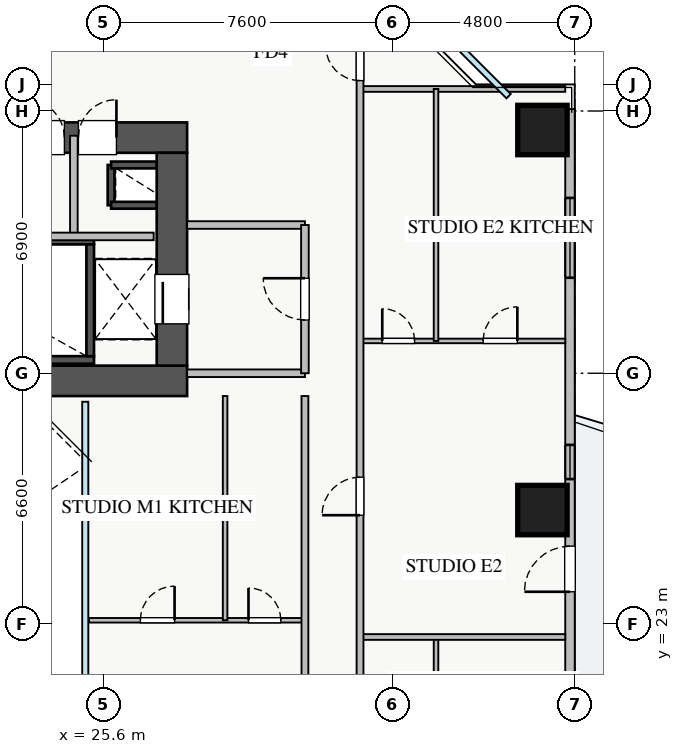
"""IFC4 building model, lengths in metres.
Left out: names, types, materials, properties, quantities, classifications, styles, units other than length and angle.
Written with IfcOpenShell. Run it as: python <this file> out.ifc"""

import sys

from ifc_helpers import new_model, si_unit, direction, frame, frame_2d, origin, origin_2d, place, context, subcontext, project, spatial, rectangle, extrude, source, transform, mapped, element, fill, save


model = new_model("IFC4")
c1 = context("Model", 3, precision=1e-05, world=origin(), true_north=direction((0.0, 1.0)))
c2 = subcontext(c1, "Body", "Model", "MODEL_VIEW")
j1 = project(units=[si_unit("LENGTHUNIT", "METRE"), si_unit("PLANEANGLEUNIT", "RADIAN")], contexts=[c1])
p1 = place(None, origin())
s1 = spatial("IfcSite", under=j1, at=p1, CompositionType="ELEMENT")
p2 = place(p1, origin())
s2 = spatial("IfcBuilding", under=s1, at=p2, CompositionType="ELEMENT")
p3 = place(p2, frame((0.0, 0.0, 89.25)))
s3 = spatial("IfcBuildingStorey", under=s2, at=p3, CompositionType="ELEMENT", Elevation=89.25)
p4 = place(p3, frame((25.8, 34.02, 0.0), z_axis=(0.0, 0.0, 1.0), x_axis=(0.0, 1.0, 0.0)))
e1 = element("IfcWall", 1, at=p4, inside=s3, PredefinedType="SHEAR", context=c2, shape_type="SweptSolid", body=[
    extrude(rectangle(XDim=1.06, YDim=0.18, at=frame_2d((0.53, 0.0))), origin(), (0.0, 0.0, 1.0), 3.03),
])
for number, where, z_axis, x_axis in (
    (2, (25.8, 35.08, 0.0), (0.0, 0.0, 1.0), (1.0, 0.0, 0.0)),
    (3, (25.8, 34.02, 0.0), (0.0, 0.0, 1.0), (1.0, 0.0, 0.0)),
):
    element("IfcWall", number, at=place(p3, frame(where, z_axis=z_axis, x_axis=x_axis)), inside=s3, PredefinedType="SHEAR", context=c2, shape_type="SweptSolid", body=[
        extrude(rectangle(XDim=1.2, YDim=0.18, at=frame_2d((0.6, 0.0))), origin(), (0.0, 0.0, 1.0), 3.03),
    ])
p5 = place(p3, frame((18.2, 29.95, 0.0), z_axis=(0.0, 0.0, 1.0), x_axis=(1.0, 0.0, 0.0)))
e4 = element("IfcWall", 4, at=p5, inside=s3, PredefinedType="SHEAR", context=c2, shape_type="SweptSolid", body=[
    extrude(rectangle(XDim=7.15, YDim=0.2, at=frame_2d((3.575, 0.0))), origin(), (0.0, 0.0, 1.0), 3.25),
])
p6 = place(p3, frame((18.2, 33.09, 0.0), z_axis=(0.0, 0.0, 1.0), x_axis=(1.0, 0.0, 0.0)))
e5 = element("IfcWall", 5, at=p6, inside=s3, PredefinedType="SHEAR", context=c2, shape_type="SweptSolid", body=[
    extrude(rectangle(XDim=7.15, YDim=0.2, at=frame_2d((3.575, 0.0))), origin(), (0.0, 0.0, 1.0), 3.25),
])
p7 = place(p6, frame((0.35, 0.0, 0.0)))
e6 = element("IfcOpeningElement", 6, at=p7, cuts=e5, PredefinedType="OPENING", context=c2, shape_type="SweptSolid", body=[
    extrude(rectangle(XDim=1.1, YDim=2.05, at=frame_2d((0.55, 1.025))), frame((0.0, 0.11, 0.0), z_axis=(0.0, -1.0, 0.0), x_axis=(1.0, 0.0, 0.0)), (0.0, 0.0, 1.0), 0.22),
])
p8 = place(p3, frame((25.25, 30.05, 0.0), z_axis=(0.0, 0.0, 1.0), x_axis=(0.0, 1.0, 0.0)))
e7 = element("IfcWall", 7, at=p8, inside=s3, PredefinedType="SHEAR", context=c2, shape_type="SweptSolid", body=[
    extrude(rectangle(XDim=2.94, YDim=0.2, at=frame_2d((1.47, 0.0))), origin(), (0.0, 0.0, 1.0), 3.25),
])
p9 = place(p3, frame((10.2, 29.4, 0.0), z_axis=(0.0, 0.0, 1.0), x_axis=(1.0, 0.0, 0.0)))
e8 = element("IfcWall", 8, at=p9, inside=s3, PredefinedType="SHEAR", context=c2, shape_type="SweptSolid", body=[
    extrude(rectangle(XDim=17.6, YDim=0.8, at=frame_2d((8.8, 0.0))), origin(), (0.0, 0.0, 1.0), 3.25),
])
p10 = place(p3, frame((10.2, 35.8, 0.0), z_axis=(0.0, 0.0, 1.0), x_axis=(1.0, 0.0, 0.0)))
e9 = element("IfcWall", 9, at=p10, inside=s3, PredefinedType="SHEAR", context=c2, shape_type="SweptSolid", body=[
    extrude(rectangle(XDim=17.6, YDim=0.8, at=frame_2d((8.8, 0.0))), origin(), (0.0, 0.0, 1.0), 3.25),
])
p11 = place(p10, frame((1.15, 0.0, 0.0)))
e10 = element("IfcOpeningElement", 10, at=p11, cuts=e9, PredefinedType="OPENING", context=c2, shape_type="SweptSolid", body=[
    extrude(rectangle(XDim=1.1, YDim=2.05, at=frame_2d((0.55, 1.025))), frame((0.0, 0.41, 0.0), z_axis=(0.0, -1.0, 0.0), x_axis=(1.0, 0.0, 0.0)), (0.0, 0.0, 1.0), 0.82),
])
p12 = place(p10, frame((8.3, 0.0, 0.0)))
e11 = element("IfcOpeningElement", 11, at=p12, cuts=e9, PredefinedType="OPENING", context=c2, shape_type="SweptSolid", body=[
    extrude(rectangle(XDim=1.1, YDim=2.05, at=frame_2d((0.55, 1.025))), frame((0.0, 0.41, 0.0), z_axis=(0.0, -1.0, 0.0), x_axis=(1.0, 0.0, 0.0)), (0.0, 0.0, 1.0), 0.82),
])
p13 = place(p10, frame((10.05, 0.0, 0.0)))
e12 = element("IfcOpeningElement", 12, at=p13, cuts=e9, PredefinedType="OPENING", context=c2, shape_type="SweptSolid", body=[
    extrude(rectangle(XDim=1.1, YDim=2.05, at=frame_2d((0.55, 1.025))), frame((0.0, 0.41, 0.0), z_axis=(0.0, -1.0, 0.0), x_axis=(1.0, 0.0, 0.0)), (0.0, 0.0, 1.0), 0.82),
])
p14 = place(p10, frame((14.74, 0.0, 0.0)))
e13 = element("IfcOpeningElement", 13, at=p14, cuts=e9, PredefinedType="OPENING", context=c2, shape_type="SweptSolid", body=[
    extrude(rectangle(XDim=1.0, YDim=2.05, at=frame_2d((0.5, 1.025))), frame((0.0, 0.41, 0.0), z_axis=(0.0, -1.0, 0.0), x_axis=(1.0, 0.0, 0.0)), (0.0, 0.0, 1.0), 0.82),
])
p15 = place(p10, frame((11.835, 0.0, 0.0)))
e14 = element("IfcOpeningElement", 14, at=p15, cuts=e9, PredefinedType="OPENING", context=c2, shape_type="SweptSolid", body=[
    extrude(rectangle(XDim=1.0, YDim=2.05, at=frame_2d((0.5, 1.025))), frame((0.0, 0.41, 0.0), z_axis=(0.0, -1.0, 0.0), x_axis=(1.0, 0.0, 0.0)), (0.0, 0.0, 1.0), 0.82),
])
p16 = place(p10, frame((13.37, 0.0, 0.0)))
e15 = element("IfcOpeningElement", 15, at=p16, cuts=e9, PredefinedType="OPENING", context=c2, shape_type="SweptSolid", body=[
    extrude(rectangle(XDim=1.0, YDim=2.05, at=frame_2d((0.5, 1.025))), frame((0.0, 0.41, 0.0), z_axis=(0.0, -1.0, 0.0), x_axis=(1.0, 0.0, 0.0)), (0.0, 0.0, 1.0), 0.82),
])
p17 = place(p3, frame((27.4, 29.8, 0.0), z_axis=(0.0, 0.0, 1.0), x_axis=(0.0, 1.0, 0.0)))
e16 = element("IfcWall", 16, at=p17, inside=s3, PredefinedType="SHEAR", context=c2, shape_type="SweptSolid", body=[
    extrude(rectangle(XDim=5.6, YDim=0.8, at=frame_2d((2.8, 0.0))), origin(), (0.0, 0.0, 1.0), 3.25),
])
p18 = place(p17, frame((1.1, 0.0, 0.0)))
e17 = element("IfcOpeningElement", 17, at=p18, cuts=e16, PredefinedType="OPENING", context=c2, shape_type="SweptSolid", body=[
    extrude(rectangle(XDim=1.3, YDim=2.05, at=frame_2d((0.65, 1.025))), frame((0.0, 0.41, 0.0), z_axis=(0.0, -1.0, 0.0), x_axis=(1.0, 0.0, 0.0)), (0.0, 0.0, 1.0), 0.82),
])
m1 = source(origin(), c2, "Body", "SweptSolid", [
    extrude(rectangle(XDim=1.3, YDim=1.3, at=origin_2d()), origin(), (0.0, 0.0, 1.0), 3.25),
])
for number, where, z_axis, x_axis in (
    (18, (37.15, 26.0, 0.0), (0.0, 0.0, 1.0), (1.0, 0.0, 0.0)),
    (19, (37.15, 36.0, 0.0), (0.0, 0.0, 1.0), (1.0, 0.0, 0.0)),
):
    element("IfcColumn", number, at=place(p3, frame(where, z_axis=z_axis, x_axis=x_axis)), inside=s3, PredefinedType="COLUMN", context=c2, shape_type="MappedRepresentation", body=[
        mapped(m1, transform((0.0, 0.0, 0.0), x_axis=(1.0, 0.0, 0.0), y_axis=(0.0, 1.0, 0.0), z_axis=(0.0, 0.0, 1.0), scale=1.0)),
    ])
p19 = place(p3, frame((37.875, 9.45, 0.0), z_axis=(0.0, 0.0, 1.0), x_axis=(0.0, 1.0, 0.0)))
e20 = element("IfcWall", 20, at=p19, inside=s3, PredefinedType="STANDARD", context=c2, shape_type="SweptSolid", body=[
    extrude(rectangle(XDim=27.1, YDim=0.25, at=frame_2d((13.55, 0.0))), origin(), (0.0, 0.0, 1.0), 2.57),
])
p20 = place(p19, frame((14.4, 0.0, 0.0)))
e21 = element("IfcOpeningElement", 21, at=p20, cuts=e20, PredefinedType="OPENING", context=c2, shape_type="SweptSolid", body=[
    extrude(rectangle(XDim=1.2, YDim=2.1, at=frame_2d((0.6, 1.05))), frame((0.0, 0.135, 0.0), z_axis=(0.0, -1.0, 0.0), x_axis=(1.0, 0.0, 0.0)), (0.0, 0.0, 1.0), 0.27),
])
p21 = place(p19, frame((2.188, 0.0, 0.9)))
e22 = element("IfcOpeningElement", 22, at=p21, cuts=e20, PredefinedType="OPENING", context=c2, shape_type="SweptSolid", body=[
    extrude(rectangle(XDim=2.4, YDim=1.48, at=frame_2d((1.2, 0.74))), frame((0.0, 0.135, 0.0), z_axis=(0.0, -1.0, 0.0), x_axis=(1.0, 0.0, 0.0)), (0.0, 0.0, 1.0), 0.27),
])
p22 = place(p19, frame((22.663, 0.0, 0.9)))
e23 = element("IfcOpeningElement", 23, at=p22, cuts=e20, PredefinedType="OPENING", context=c2, shape_type="SweptSolid", body=[
    extrude(rectangle(XDim=2.1, YDim=1.48, at=frame_2d((1.05, 0.74))), frame((0.0, 0.135, 0.0), z_axis=(0.0, -1.0, 0.0), x_axis=(1.0, 0.0, 0.0)), (0.0, 0.0, 1.0), 0.27),
])
p23 = place(p19, frame((17.365, 0.0, 0.9)))
e24 = element("IfcOpeningElement", 24, at=p23, cuts=e20, PredefinedType="OPENING", context=c2, shape_type="SweptSolid", body=[
    extrude(rectangle(XDim=0.9, YDim=1.2, at=frame_2d((0.45, 0.6))), frame((0.0, 0.135, 0.0), z_axis=(0.0, -1.0, 0.0), x_axis=(1.0, 0.0, 0.0)), (0.0, 0.0, 1.0), 0.27),
])
for number, where, z_axis, x_axis in (
    (25, (27.8, 29.6, 0.0), (0.0, 0.0, 1.0), (1.0, 0.0, 0.0)),
    (26, (27.8, 33.5, 0.0), (0.0, 0.0, 1.0), (1.0, 0.0, 0.0)),
):
    element("IfcWall", number, at=place(p3, frame(where, z_axis=z_axis, x_axis=x_axis)), inside=s3, PredefinedType="PARTITIONING", context=c2, shape_type="SweptSolid", body=[
        extrude(rectangle(XDim=3.1, YDim=0.2, at=frame_2d((1.55, 0.0))), origin(), (0.0, 0.0, 1.0), 3.03),
    ])
p24 = place(p3, frame((30.9, 29.6, 0.0), z_axis=(0.0, 0.0, 1.0), x_axis=(0.0, 1.0, 0.0)))
e27 = element("IfcWall", 27, at=p24, inside=s3, PredefinedType="PARTITIONING", context=c2, shape_type="SweptSolid", body=[
    extrude(rectangle(XDim=3.9, YDim=0.2, at=frame_2d((1.95, 0.0))), origin(), (0.0, 0.0, 1.0), 3.03),
])
p25 = place(p24, frame((1.4, 0.0, 0.0)))
e28 = element("IfcOpeningElement", 28, at=p25, cuts=e27, PredefinedType="OPENING", context=c2, shape_type="SweptSolid", body=[
    extrude(rectangle(XDim=1.1, YDim=2.05, at=frame_2d((0.55, 1.025))), frame((0.0, 0.11, 0.0), z_axis=(0.0, -1.0, 0.0), x_axis=(1.0, 0.0, 0.0)), (0.0, 0.0, 1.0), 0.22),
])
p26 = place(p3, frame((24.82, 33.2, 0.0), z_axis=(0.0, 0.0, 1.0), x_axis=(0.0, 1.0, 0.0)))
e29 = element("IfcWall", 29, at=p26, inside=s3, PredefinedType="PARTITIONING", context=c2, shape_type="SweptSolid", body=[
    extrude(rectangle(XDim=2.65, YDim=0.2, at=frame_2d((1.325, 0.0))), origin(), (0.0, 0.0, 1.0), 3.03),
])
p27 = place(p3, frame((21.75, 33.2, 0.0), z_axis=(0.0, 0.0, 1.0), x_axis=(1.0, 0.0, 0.0)))
e30 = element("IfcWall", 30, at=p27, inside=s3, PredefinedType="PARTITIONING", context=c2, shape_type="SweptSolid", body=[
    extrude(rectangle(XDim=5.17, YDim=0.2, at=frame_2d((2.585, 0.0))), origin(), (0.0, 0.0, 1.0), 3.03),
])
p28 = place(p3, frame((32.35, 37.08, 0.0), z_axis=(0.0, 0.0, 1.0), x_axis=(1.0, 0.0, 0.0)))
e31 = element("IfcWall", 31, at=p28, inside=s3, PredefinedType="PARTITIONING", context=c2, shape_type="SweptSolid", body=[
    extrude(rectangle(XDim=5.4, YDim=0.15, at=frame_2d((2.7, 0.0))), origin(), (0.0, 0.0, 1.0), 3.03),
])
p29 = place(p3, frame((34.35, 16.34, 0.0), z_axis=(0.0, 0.0, 1.0), x_axis=(0.0, 1.0, 0.0)))
e32 = element("IfcWall", 32, at=p29, inside=s3, PredefinedType="PLUMBINGWALL", context=c2, shape_type="SweptSolid", body=[
    extrude(rectangle(XDim=6.32, YDim=0.12, at=frame_2d((3.16, 0.0))), origin(), (0.0, 0.0, 1.0), 3.03),
])
p30 = place(p3, frame((32.35, 30.45, 0.0), z_axis=(0.0, 0.0, 1.0), x_axis=(1.0, 0.0, 0.0)))
e33 = element("IfcWall", 33, at=p30, inside=s3, PredefinedType="PLUMBINGWALL", context=c2, shape_type="SweptSolid", body=[
    extrude(rectangle(XDim=5.4, YDim=0.12, at=frame_2d((2.7, 0.0))), origin(), (0.0, 0.0, 1.0), 3.03),
])
p31 = place(p30, frame((0.585, 0.0, 0.0)))
e34 = element("IfcOpeningElement", 34, at=p31, cuts=e33, PredefinedType="OPENING", context=c2, shape_type="SweptSolid", body=[
    extrude(rectangle(XDim=0.85, YDim=2.05, at=frame_2d((0.425, 1.025))), frame((0.0, 0.07, 0.0), z_axis=(0.0, -1.0, 0.0), x_axis=(1.0, 0.0, 0.0)), (0.0, 0.0, 1.0), 0.14),
])
p32 = place(p30, frame((3.24, 0.0, 0.0)))
e35 = element("IfcOpeningElement", 35, at=p32, cuts=e33, PredefinedType="OPENING", context=c2, shape_type="SweptSolid", body=[
    extrude(rectangle(XDim=0.9, YDim=2.05, at=frame_2d((0.45, 1.025))), frame((0.0, 0.07, 0.0), z_axis=(0.0, -1.0, 0.0), x_axis=(1.0, 0.0, 0.0)), (0.0, 0.0, 1.0), 0.14),
])
p33 = place(p3, frame((34.35, 30.45, 0.0), z_axis=(0.0, 0.0, 1.0), x_axis=(0.0, 1.0, 0.0)))
e36 = element("IfcWall", 36, at=p33, inside=s3, PredefinedType="PLUMBINGWALL", context=c2, shape_type="SweptSolid", body=[
    extrude(rectangle(XDim=6.63, YDim=0.12, at=frame_2d((3.315, 0.0))), origin(), (0.0, 0.0, 1.0), 3.03),
])
p34 = place(p3, frame((32.35, 22.66, 0.0), z_axis=(0.0, 0.0, 1.0), x_axis=(1.0, 0.0, 0.0)))
e37 = element("IfcWall", 37, at=p34, inside=s3, PredefinedType="PARTITIONING", context=c2, shape_type="SweptSolid", body=[
    extrude(rectangle(XDim=5.4, YDim=0.15, at=frame_2d((2.7, 0.0))), origin(), (0.0, 0.0, 1.0), 3.03),
])
p35 = place(p3, frame((32.35, 7.21, 0.0), z_axis=(0.0, 0.0, 1.0), x_axis=(0.0, 1.0, 0.0)))
e38 = element("IfcWall", 38, at=p35, inside=s3, PredefinedType="PARTITIONING", context=c2, shape_type="SweptSolid", body=[
    extrude(rectangle(XDim=31.23, YDim=0.18, at=frame_2d((15.615, 0.0))), origin(), (0.0, 0.0, 1.0), 2.725),
])
p36 = place(p35, frame((30.09, 0.0, 0.0)))
e39 = element("IfcOpeningElement", 39, at=p36, cuts=e38, PredefinedType="OPENING", context=c2, shape_type="SweptSolid", body=[
    extrude(rectangle(XDim=0.9, YDim=2.05, at=frame_2d((0.45, 1.025))), frame((0.0, 0.1, 0.0), z_axis=(0.0, -1.0, 0.0), x_axis=(1.0, 0.0, 0.0)), (0.0, 0.0, 1.0), 0.2),
])
p37 = place(p35, frame((0.415, 0.0, 0.0)))
e40 = element("IfcOpeningElement", 40, at=p37, cuts=e38, PredefinedType="OPENING", context=c2, shape_type="SweptSolid", body=[
    extrude(rectangle(XDim=0.9, YDim=2.05, at=frame_2d((0.45, 1.025))), frame((0.0, 0.1, 0.0), z_axis=(0.0, -1.0, 0.0), x_axis=(1.0, 0.0, 0.0)), (0.0, 0.0, 1.0), 0.2),
])
p38 = place(p35, frame((4.73, 0.0, 0.0)))
e41 = element("IfcOpeningElement", 41, at=p38, cuts=e38, PredefinedType="OPENING", context=c2, shape_type="SweptSolid", body=[
    extrude(rectangle(XDim=1.0, YDim=2.05, at=frame_2d((0.5, 1.025))), frame((0.0, 0.1, 0.0), z_axis=(0.0, -1.0, 0.0), x_axis=(1.0, 0.0, 0.0)), (0.0, 0.0, 1.0), 0.2),
])
p39 = place(p35, frame((18.655, 0.0, 0.0)))
e42 = element("IfcOpeningElement", 42, at=p39, cuts=e38, PredefinedType="OPENING", context=c2, shape_type="SweptSolid", body=[
    extrude(rectangle(XDim=1.0, YDim=2.05, at=frame_2d((0.5, 1.025))), frame((0.0, 0.1, 0.0), z_axis=(0.0, -1.0, 0.0), x_axis=(1.0, 0.0, 0.0)), (0.0, 0.0, 1.0), 0.2),
])
p40 = place(p3, frame((25.22, 23.1, 0.0), z_axis=(0.0, 0.0, 1.0), x_axis=(1.0, 0.0, 0.0)))
e43 = element("IfcWall", 43, at=p40, inside=s3, PredefinedType="PLUMBINGWALL", context=c2, shape_type="SweptSolid", body=[
    extrude(rectangle(XDim=5.68, YDim=0.12, at=frame_2d((2.84, 0.0))), origin(), (0.0, 0.0, 1.0), 3.03),
])
p41 = place(p40, frame((1.35, 0.0, 0.0)))
e44 = element("IfcOpeningElement", 44, at=p41, cuts=e43, PredefinedType="OPENING", context=c2, shape_type="SweptSolid", body=[
    extrude(rectangle(XDim=0.9, YDim=2.05, at=frame_2d((0.45, 1.025))), frame((0.0, 0.07, 0.0), z_axis=(0.0, -1.0, 0.0), x_axis=(1.0, 0.0, 0.0)), (0.0, 0.0, 1.0), 0.14),
])
p42 = place(p40, frame((4.195, 0.0, 0.0)))
e45 = element("IfcOpeningElement", 45, at=p42, cuts=e43, PredefinedType="OPENING", context=c2, shape_type="SweptSolid", body=[
    extrude(rectangle(XDim=0.85, YDim=2.05, at=frame_2d((0.425, 1.025))), frame((0.0, 0.07, 0.0), z_axis=(0.0, -1.0, 0.0), x_axis=(1.0, 0.0, 0.0)), (0.0, 0.0, 1.0), 0.14),
])
p43 = place(p3, frame((28.8, 23.1, 0.0), z_axis=(0.0, 0.0, 1.0), x_axis=(0.0, 1.0, 0.0)))
e46 = element("IfcWall", 46, at=p43, inside=s3, PredefinedType="PLUMBINGWALL", context=c2, shape_type="SweptSolid", body=[
    extrude(rectangle(XDim=5.9, YDim=0.12, at=frame_2d((2.95, 0.0))), origin(), (0.0, 0.0, 1.0), 3.03),
])
p44 = place(p3, frame((30.9, 17.0, 0.0), z_axis=(0.0, 0.0, 1.0), x_axis=(0.0, 1.0, 0.0)))
e47 = element("IfcWall", 47, at=p44, inside=s3, PredefinedType="PARTITIONING", context=c2, shape_type="SweptSolid", body=[
    extrude(rectangle(XDim=12.0, YDim=0.18, at=frame_2d((6.0, 0.0))), origin(), (0.0, 0.0, 1.0), 3.03),
])
p45 = place(p44, frame((2.36, 0.0, 0.0)))
e48 = element("IfcOpeningElement", 48, at=p45, cuts=e47, PredefinedType="OPENING", context=c2, shape_type="SweptSolid", body=[
    extrude(rectangle(XDim=1.0, YDim=2.05, at=frame_2d((0.5, 1.025))), frame((0.0, 0.1, 0.0), z_axis=(0.0, -1.0, 0.0), x_axis=(1.0, 0.0, 0.0)), (0.0, 0.0, 1.0), 0.2),
])
m2 = source(origin(), c2, "Body", "SweptSolid", [
    extrude(rectangle(XDim=1.2, YDim=2.1, at=frame_2d((0.6, 1.05))), frame((0.0, 0.025, 0.0), z_axis=(0.0, -1.0, 0.0), x_axis=(1.0, 0.0, 0.0)), (0.0, 0.0, 1.0), 0.05),
])
p46 = place(p20, origin())
e49 = element("IfcDoor", 49, at=p46, inside=s3, OperationType="SINGLE_SWING_LEFT", PredefinedType="DOOR", context=c2, shape_type="MappedRepresentation", body=[
    mapped(m2, transform((0.0, 0.0, 0.0), x_axis=(1.0, 0.0, 0.0), y_axis=(0.0, 1.0, 0.0), z_axis=(0.0, 0.0, 1.0), scale=1.0)),
])
fill(e21, e49)
m3 = source(origin(), c2, "Body", "SweptSolid", [
    extrude(rectangle(XDim=2.1, YDim=1.48, at=frame_2d((1.05, 0.74))), frame((0.0, 0.03, 0.0), z_axis=(0.0, -1.0, 0.0), x_axis=(1.0, 0.0, 0.0)), (0.0, 0.0, 1.0), 0.06),
])
p47 = place(p22, origin())
e50 = element("IfcWindow", 50, at=p47, inside=s3, PartitioningType="TRIPLE_PANEL_VERTICAL", PredefinedType="WINDOW", context=c2, shape_type="MappedRepresentation", body=[
    mapped(m3, transform((0.0, 0.0, 0.0), x_axis=(1.0, 0.0, 0.0), y_axis=(0.0, 1.0, 0.0), z_axis=(0.0, 0.0, 1.0), scale=1.0)),
])
fill(e23, e50)
m4 = source(origin(), c2, "Body", "SweptSolid", [
    extrude(rectangle(XDim=1.3, YDim=2.05, at=frame_2d((0.65, 1.025))), frame((0.0, 0.025, 0.0), z_axis=(0.0, -1.0, 0.0), x_axis=(1.0, 0.0, 0.0)), (0.0, 0.0, 1.0), 0.05),
])
p48 = place(p18, origin())
e51 = element("IfcDoor", 51, at=p48, inside=s3, OperationType="SLIDING_TO_LEFT", PredefinedType="DOOR", context=c2, shape_type="MappedRepresentation", body=[
    mapped(m4, transform((0.0, 0.0, 0.0), x_axis=(1.0, 0.0, 0.0), y_axis=(0.0, 1.0, 0.0), z_axis=(0.0, 0.0, 1.0), scale=1.0)),
])
fill(e17, e51)
m5 = source(origin(), c2, "Body", "SweptSolid", [
    extrude(rectangle(XDim=1.0, YDim=2.05, at=frame_2d((0.5, 1.025))), frame((0.0, 0.025, 0.0), z_axis=(0.0, -1.0, 0.0), x_axis=(1.0, 0.0, 0.0)), (0.0, 0.0, 1.0), 0.05),
])
p49 = place(p14, origin())
e52 = element("IfcDoor", 52, at=p49, inside=s3, OperationType="SINGLE_SWING_RIGHT", PredefinedType="DOOR", context=c2, shape_type="MappedRepresentation", body=[
    mapped(m5, transform((0.0, 0.0, 0.0), x_axis=(1.0, 0.0, 0.0), y_axis=(0.0, 1.0, 0.0), z_axis=(0.0, 0.0, 1.0), scale=1.0)),
])
fill(e13, e52)
p50 = place(p16, origin())
e53 = element("IfcDoor", 53, at=p50, inside=s3, OperationType="SINGLE_SWING_LEFT", PredefinedType="DOOR", context=c2, shape_type="MappedRepresentation", body=[
    mapped(m5, transform((0.0, 0.0, 0.0), x_axis=(1.0, 0.0, 0.0), y_axis=(0.0, 1.0, 0.0), z_axis=(0.0, 0.0, 1.0), scale=1.0)),
])
fill(e15, e53)
m6 = source(origin(), c2, "Body", "SweptSolid", [
    extrude(rectangle(XDim=1.1, YDim=2.05, at=frame_2d((0.55, 1.025))), frame((0.0, 0.025, 0.0), z_axis=(0.0, -1.0, 0.0), x_axis=(1.0, 0.0, 0.0)), (0.0, 0.0, 1.0), 0.05),
])
p51 = place(p25, origin())
e54 = element("IfcDoor", 54, at=p51, inside=s3, OperationType="SINGLE_SWING_RIGHT", PredefinedType="DOOR", context=c2, shape_type="MappedRepresentation", body=[
    mapped(m6, transform((0.0, 0.0, 0.0), x_axis=(1.0, 0.0, 0.0), y_axis=(0.0, 1.0, 0.0), z_axis=(0.0, 0.0, 1.0), scale=1.0)),
])
fill(e28, e54)
m7 = source(origin(), c2, "Body", "SweptSolid", [
    extrude(rectangle(XDim=0.85, YDim=2.05, at=frame_2d((0.425, 1.025))), frame((0.0, 0.025, 0.0), z_axis=(0.0, -1.0, 0.0), x_axis=(1.0, 0.0, 0.0)), (0.0, 0.0, 1.0), 0.05),
])
p52 = place(p31, origin())
e55 = element("IfcDoor", 55, at=p52, inside=s3, OperationType="SINGLE_SWING_LEFT", PredefinedType="DOOR", context=c2, shape_type="MappedRepresentation", body=[
    mapped(m7, transform((0.0, 0.0, 0.0), x_axis=(1.0, 0.0, 0.0), y_axis=(0.0, 1.0, 0.0), z_axis=(0.0, 0.0, 1.0), scale=1.0)),
])
fill(e34, e55)
m8 = source(origin(), c2, "Body", "SweptSolid", [
    extrude(rectangle(XDim=0.9, YDim=2.05, at=frame_2d((0.45, 1.025))), frame((0.0, 0.025, 0.0), z_axis=(0.0, -1.0, 0.0), x_axis=(1.0, 0.0, 0.0)), (0.0, 0.0, 1.0), 0.05),
])
p53 = place(p32, origin())
e56 = element("IfcDoor", 56, at=p53, inside=s3, OperationType="SINGLE_SWING_RIGHT", PredefinedType="DOOR", context=c2, shape_type="MappedRepresentation", body=[
    mapped(m8, transform((0.0, 0.0, 0.0), x_axis=(1.0, 0.0, 0.0), y_axis=(0.0, 1.0, 0.0), z_axis=(0.0, 0.0, 1.0), scale=1.0)),
])
fill(e35, e56)
p54 = place(p36, origin())
e57 = element("IfcDoor", 57, at=p54, inside=s3, OperationType="SINGLE_SWING_RIGHT", PredefinedType="DOOR", context=c2, shape_type="MappedRepresentation", body=[
    mapped(m8, transform((0.0, 0.0, 0.0), x_axis=(1.0, 0.0, 0.0), y_axis=(0.0, 1.0, 0.0), z_axis=(0.0, 0.0, 1.0), scale=1.0)),
])
fill(e39, e57)
p55 = place(p39, origin())
e58 = element("IfcDoor", 58, at=p55, inside=s3, OperationType="SINGLE_SWING_LEFT", PredefinedType="DOOR", context=c2, shape_type="MappedRepresentation", body=[
    mapped(m5, transform((0.0, 0.0, 0.0), x_axis=(1.0, 0.0, 0.0), y_axis=(0.0, 1.0, 0.0), z_axis=(0.0, 0.0, 1.0), scale=1.0)),
])
fill(e42, e58)
p56 = place(p41, origin())
e59 = element("IfcDoor", 59, at=p56, inside=s3, OperationType="SINGLE_SWING_RIGHT", PredefinedType="DOOR", context=c2, shape_type="MappedRepresentation", body=[
    mapped(m8, transform((0.0, 0.0, 0.0), x_axis=(1.0, 0.0, 0.0), y_axis=(0.0, 1.0, 0.0), z_axis=(0.0, 0.0, 1.0), scale=1.0)),
])
fill(e44, e59)
p57 = place(p42, origin())
e60 = element("IfcDoor", 60, at=p57, inside=s3, OperationType="SINGLE_SWING_LEFT", PredefinedType="DOOR", context=c2, shape_type="MappedRepresentation", body=[
    mapped(m7, transform((0.0, 0.0, 0.0), x_axis=(1.0, 0.0, 0.0), y_axis=(0.0, 1.0, 0.0), z_axis=(0.0, 0.0, 1.0), scale=1.0)),
])
fill(e45, e60)
m9 = source(origin(), c2, "Body", "SweptSolid", [
    extrude(rectangle(XDim=0.9, YDim=1.2, at=frame_2d((0.45, 0.6))), frame((0.0, 0.03, 0.0), z_axis=(0.0, -1.0, 0.0), x_axis=(1.0, 0.0, 0.0)), (0.0, 0.0, 1.0), 0.06),
])
p58 = place(p23, origin())
e61 = element("IfcWindow", 61, at=p58, inside=s3, PartitioningType="SINGLE_PANEL", PredefinedType="WINDOW", context=c2, shape_type="MappedRepresentation", body=[
    mapped(m9, transform((0.0, 0.0, 0.0), x_axis=(1.0, 0.0, 0.0), y_axis=(0.0, 1.0, 0.0), z_axis=(0.0, 0.0, 1.0), scale=1.0)),
])
fill(e24, e61)
save(model, sys.argv[1])
